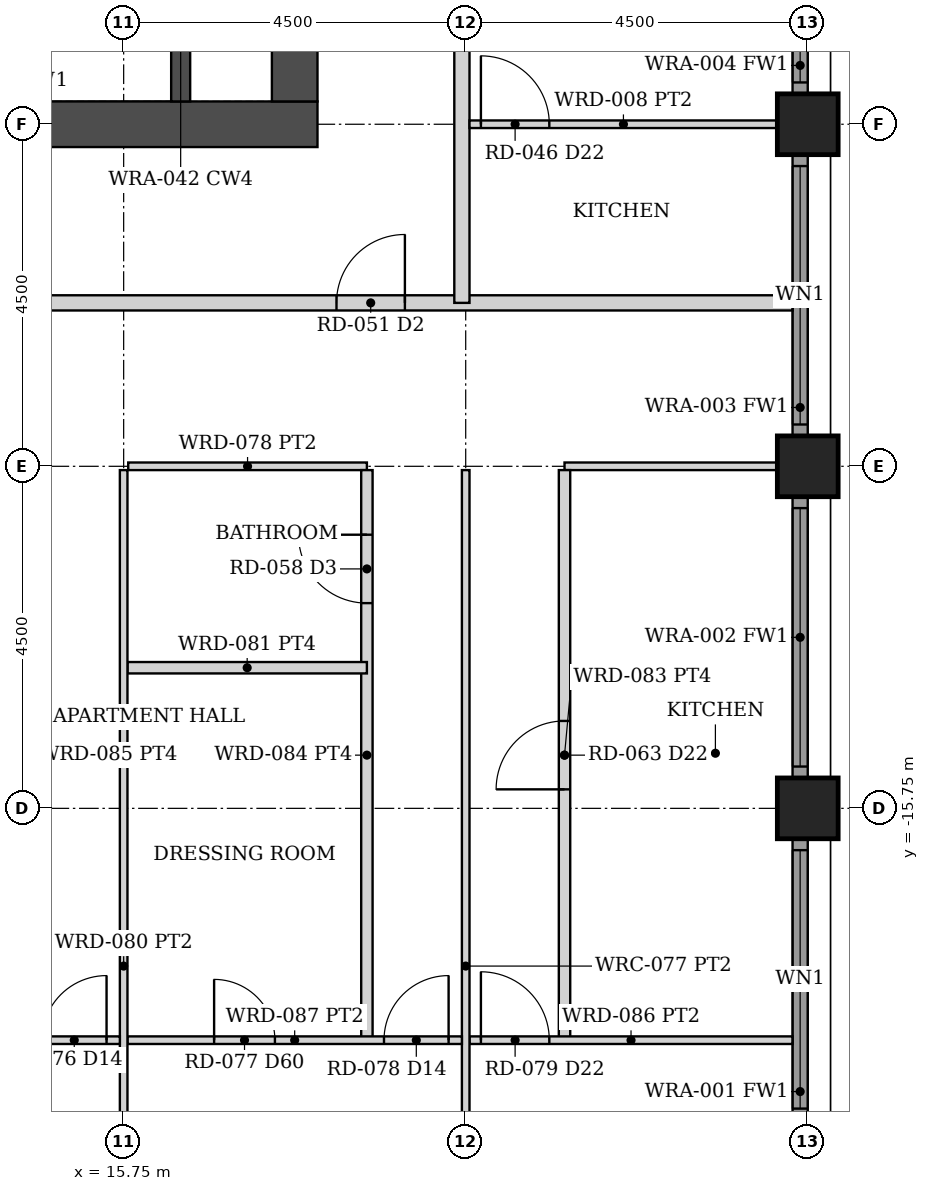
"""IFC4 building model, lengths in metres.
Left out: names, types, materials, properties, quantities, classifications, styles, units other than length and angle.
Written with IfcOpenShell. Run it as: python <this file> out.ifc"""

import sys

from ifc_helpers import new_model, si_unit, direction, frame, frame_2d, origin, origin_2d, place, context, subcontext, project, spatial, rectangle, hollow_rectangle, extrude, element, fill, save


model = new_model("IFC4")
c1 = context("Model", 3, precision=1e-05, world=origin(), true_north=direction((0.0, 1.0)))
c2 = subcontext(c1, "Body", "Model", "MODEL_VIEW")
j1 = project(units=[si_unit("LENGTHUNIT", "METRE"), si_unit("PLANEANGLEUNIT", "RADIAN")], contexts=[c1])
p1 = place(None, origin())
s1 = spatial("IfcSite", under=j1, at=p1, CompositionType="ELEMENT")
p2 = place(p1, origin())
s2 = spatial("IfcBuilding", under=s1, at=p2, CompositionType="ELEMENT")
p3 = place(p2, frame((0.0, 0.0, 58.0)))
s3 = spatial("IfcBuildingStorey", under=s2, at=p3, CompositionType="ELEMENT", Elevation=58.0)
for number, where, z_axis, x_axis in (
    (1, (24.75, -15.75, 0.0), (0.0, 0.0, 1.0), (1.0, 0.0, 0.0)),
    (2, (24.75, -11.25, 0.0), (0.0, 0.0, 1.0), (1.0, 0.0, 0.0)),
    (3, (24.75, -6.75, 0.0), (0.0, 0.0, 1.0), (1.0, 0.0, 0.0)),
):
    element("IfcColumn", number, at=place(p3, frame(where, z_axis=z_axis, x_axis=x_axis)), inside=s3, PredefinedType="COLUMN", context=c2, shape_type="SweptSolid", body=[
        extrude(hollow_rectangle(XDim=0.8, YDim=0.8, WallThickness=0.06, at=origin_2d()), origin(), (0.0, 0.0, 1.0), 3.5),
    ])
p4 = place(p3, frame((8.7, -6.75, 0.0), z_axis=(0.0, 0.0, 1.0), x_axis=(1.0, 0.0, 0.0)))
e4 = element("IfcWall", 4, at=p4, inside=s3, PredefinedType="SHEAR", context=c2, shape_type="SweptSolid", body=[
    extrude(rectangle(XDim=9.6, YDim=0.6, at=frame_2d((4.8, 0.0))), origin(), (0.0, 0.0, 1.0), 3.5),
])
p5 = place(p3, frame((18.0, -6.45, 0.0), z_axis=(0.0, 0.0, 1.0), x_axis=(0.0, 1.0, 0.0)))
e5 = element("IfcWall", 5, at=p5, inside=s3, PredefinedType="SHEAR", context=c2, shape_type="SweptSolid", body=[
    extrude(rectangle(XDim=12.9, YDim=0.6, at=frame_2d((6.45, 0.0))), origin(), (0.0, 0.0, 1.0), 3.5),
])
p6 = place(p3, frame((16.5, -6.45, 0.0), z_axis=(0.0, 0.0, 1.0), x_axis=(0.0, 1.0, 0.0)))
e6 = element("IfcWall", 6, at=p6, inside=s3, PredefinedType="SHEAR", context=c2, shape_type="SweptSolid", body=[
    extrude(rectangle(XDim=3.125, YDim=0.25, at=frame_2d((1.562, 0.0))), origin(), (0.0, 0.0, 1.0), 3.5),
])
p7 = place(p3, frame((24.65, -19.845, 0.0), z_axis=(0.0, 0.0, 1.0), x_axis=(0.0, 1.0, 0.0)))
e7 = element("IfcWall", 7, at=p7, inside=s3, PredefinedType="SOLIDWALL", context=c2, shape_type="SweptSolid", body=[
    extrude(rectangle(XDim=3.69, YDim=0.2, at=frame_2d((1.845, 0.0))), origin(), (0.0, 0.0, 1.0), 2.379),
])
p8 = place(p7, frame((0.145, 0.0, 0.3)))
e8 = element("IfcOpeningElement", 8, at=p8, cuts=e7, PredefinedType="OPENING", context=c2, shape_type="SweptSolid", body=[
    extrude(rectangle(XDim=3.4, YDim=1.929, at=frame_2d((1.7, 0.964))), frame((0.0, 0.11, 0.0), z_axis=(0.0, -1.0, 0.0), x_axis=(1.0, 0.0, 0.0)), (0.0, 0.0, 1.0), 0.22),
])
p9 = place(p3, frame((24.65, -15.345, 0.0), z_axis=(0.0, 0.0, 1.0), x_axis=(0.0, 1.0, 0.0)))
e9 = element("IfcWall", 9, at=p9, inside=s3, PredefinedType="SOLIDWALL", context=c2, shape_type="SweptSolid", body=[
    extrude(rectangle(XDim=3.69, YDim=0.2, at=frame_2d((1.845, 0.0))), origin(), (0.0, 0.0, 1.0), 2.379),
])
p10 = place(p9, frame((0.145, 0.0, 0.3)))
e10 = element("IfcOpeningElement", 10, at=p10, cuts=e9, PredefinedType="OPENING", context=c2, shape_type="SweptSolid", body=[
    extrude(rectangle(XDim=3.4, YDim=1.929, at=frame_2d((1.7, 0.964))), frame((0.0, 0.11, 0.0), z_axis=(0.0, -1.0, 0.0), x_axis=(1.0, 0.0, 0.0)), (0.0, 0.0, 1.0), 0.22),
])
p11 = place(p3, frame((24.65, -10.845, 0.0), z_axis=(0.0, 0.0, 1.0), x_axis=(0.0, 1.0, 0.0)))
e11 = element("IfcWall", 11, at=p11, inside=s3, PredefinedType="SOLIDWALL", context=c2, shape_type="SweptSolid", body=[
    extrude(rectangle(XDim=3.69, YDim=0.2, at=frame_2d((1.845, 0.0))), origin(), (0.0, 0.0, 1.0), 2.379),
])
p12 = place(p11, frame((0.145, 0.0, 0.3)))
e12 = element("IfcOpeningElement", 12, at=p12, cuts=e11, PredefinedType="OPENING", context=c2, shape_type="SweptSolid", body=[
    extrude(rectangle(XDim=3.4, YDim=1.929, at=frame_2d((1.7, 0.964))), frame((0.0, 0.11, 0.0), z_axis=(0.0, -1.0, 0.0), x_axis=(1.0, 0.0, 0.0)), (0.0, 0.0, 1.0), 0.22),
])
p13 = place(p3, frame((24.65, -6.345, 0.0), z_axis=(0.0, 0.0, 1.0), x_axis=(0.0, 1.0, 0.0)))
e13 = element("IfcWall", 13, at=p13, inside=s3, PredefinedType="SOLIDWALL", context=c2, shape_type="SweptSolid", body=[
    extrude(rectangle(XDim=3.69, YDim=0.2, at=frame_2d((1.845, 0.0))), origin(), (0.0, 0.0, 1.0), 2.379),
])
p14 = place(p13, frame((0.145, 0.0, 0.3)))
e14 = element("IfcOpeningElement", 14, at=p14, cuts=e13, PredefinedType="OPENING", context=c2, shape_type="SweptSolid", body=[
    extrude(rectangle(XDim=3.4, YDim=1.929, at=frame_2d((1.7, 0.964))), frame((0.0, 0.11, 0.0), z_axis=(0.0, -1.0, 0.0), x_axis=(1.0, 0.0, 0.0)), (0.0, 0.0, 1.0), 0.22),
])
p15 = place(p3, frame((-24.55, -9.1, 0.0), z_axis=(0.0, 0.0, 1.0), x_axis=(1.0, 0.0, 0.0)))
e15 = element("IfcWall", 15, at=p15, inside=s3, PredefinedType="PARTITIONING", context=c2, shape_type="SweptSolid", body=[
    extrude(rectangle(XDim=49.1, YDim=0.2, at=frame_2d((24.55, 0.0))), origin(), (0.0, 0.0, 1.0), 2.373),
])
p16 = place(p15, frame((5.1, 0.0, 0.0)))
e16 = element("IfcOpeningElement", 16, at=p16, cuts=e15, PredefinedType="OPENING", context=c2, shape_type="SweptSolid", body=[
    extrude(rectangle(XDim=0.9, YDim=2.1, at=frame_2d((0.45, 1.05))), frame((0.0, 0.11, 0.0), z_axis=(0.0, -1.0, 0.0), x_axis=(1.0, 0.0, 0.0)), (0.0, 0.0, 1.0), 0.22),
])
p17 = place(p15, frame((18.1, 0.0, 0.0)))
e17 = element("IfcOpeningElement", 17, at=p17, cuts=e15, PredefinedType="OPENING", context=c2, shape_type="SweptSolid", body=[
    extrude(rectangle(XDim=0.9, YDim=2.1, at=frame_2d((0.45, 1.05))), frame((0.0, 0.11, 0.0), z_axis=(0.0, -1.0, 0.0), x_axis=(1.0, 0.0, 0.0)), (0.0, 0.0, 1.0), 0.22),
])
p18 = place(p15, frame((22.5, 0.0, 0.0)))
e18 = element("IfcOpeningElement", 18, at=p18, cuts=e15, PredefinedType="OPENING", context=c2, shape_type="SweptSolid", body=[
    extrude(rectangle(XDim=0.9, YDim=2.1, at=frame_2d((0.45, 1.05))), frame((0.0, 0.11, 0.0), z_axis=(0.0, -1.0, 0.0), x_axis=(1.0, 0.0, 0.0)), (0.0, 0.0, 1.0), 0.22),
])
p19 = place(p15, frame((27.1, 0.0, 0.0)))
e19 = element("IfcOpeningElement", 19, at=p19, cuts=e15, PredefinedType="OPENING", context=c2, shape_type="SweptSolid", body=[
    extrude(rectangle(XDim=0.9, YDim=2.1, at=frame_2d((0.45, 1.05))), frame((0.0, 0.11, 0.0), z_axis=(0.0, -1.0, 0.0), x_axis=(1.0, 0.0, 0.0)), (0.0, 0.0, 1.0), 0.22),
])
p20 = place(p15, frame((43.1, 0.0, 0.0)))
e20 = element("IfcOpeningElement", 20, at=p20, cuts=e15, PredefinedType="OPENING", context=c2, shape_type="SweptSolid", body=[
    extrude(rectangle(XDim=0.9, YDim=2.1, at=frame_2d((0.45, 1.05))), frame((0.0, 0.11, 0.0), z_axis=(0.0, -1.0, 0.0), x_axis=(1.0, 0.0, 0.0)), (0.0, 0.0, 1.0), 0.22),
])
p21 = place(p3, frame((20.2, -9.1, 0.0), z_axis=(0.0, 0.0, 1.0), x_axis=(0.0, 1.0, 0.0)))
e21 = element("IfcWall", 21, at=p21, inside=s3, PredefinedType="PARTITIONING", context=c2, shape_type="SweptSolid", body=[
    extrude(rectangle(XDim=18.2, YDim=0.2, at=frame_2d((9.1, 0.0))), origin(), (0.0, 0.0, 1.0), 2.373),
])
p22 = place(p21, frame((6.4, 0.0, 0.0)))
e22 = element("IfcOpeningElement", 22, at=p22, cuts=e21, PredefinedType="OPENING", context=c2, shape_type="SweptSolid", body=[
    extrude(rectangle(XDim=0.9, YDim=2.1, at=frame_2d((0.45, 1.05))), frame((0.0, 0.11, 0.0), z_axis=(0.0, -1.0, 0.0), x_axis=(1.0, 0.0, 0.0)), (0.0, 0.0, 1.0), 0.22),
])
p23 = place(p3, frame((21.55, -11.25, 0.0), z_axis=(0.0, 0.0, 1.0), x_axis=(1.0, 0.0, 0.0)))
e23 = element("IfcWall", 23, at=p23, inside=s3, PredefinedType="PARTITIONING", context=c2, shape_type="SweptSolid", body=[
    extrude(rectangle(XDim=2.8, YDim=0.1, at=frame_2d((1.4, 0.0))), origin(), (0.0, 0.0, 1.0), 2.373),
])
p24 = place(p3, frame((21.55, -18.8, 0.0), z_axis=(0.0, 0.0, 1.0), x_axis=(0.0, 1.0, 0.0)))
e24 = element("IfcWall", 24, at=p24, inside=s3, PredefinedType="PARTITIONING", context=c2, shape_type="SweptSolid", body=[
    extrude(rectangle(XDim=7.5, YDim=0.15, at=frame_2d((3.75, 0.0))), origin(), (0.0, 0.0, 1.0), 2.373),
])
p25 = place(p24, frame((3.3, 0.0, 0.0)))
e25 = element("IfcOpeningElement", 25, at=p25, cuts=e24, PredefinedType="OPENING", context=c2, shape_type="SweptSolid", body=[
    extrude(rectangle(XDim=0.9, YDim=2.1, at=frame_2d((0.45, 1.05))), frame((0.0, 0.085, 0.0), z_axis=(0.0, -1.0, 0.0), x_axis=(1.0, 0.0, 0.0)), (0.0, 0.0, 1.0), 0.17),
])
p26 = place(p3, frame((20.3, -18.8, 0.0), z_axis=(0.0, 0.0, 1.0), x_axis=(1.0, 0.0, 0.0)))
e26 = element("IfcWall", 26, at=p26, inside=s3, PredefinedType="PARTITIONING", context=c2, shape_type="SweptSolid", body=[
    extrude(rectangle(XDim=4.25, YDim=0.1, at=frame_2d((2.125, 0.0))), origin(), (0.0, 0.0, 1.0), 2.373),
])
p27 = place(p26, frame((0.15, 0.0, 0.0)))
e27 = element("IfcOpeningElement", 27, at=p27, cuts=e26, PredefinedType="OPENING", context=c2, shape_type="SweptSolid", body=[
    extrude(rectangle(XDim=0.9, YDim=2.1, at=frame_2d((0.45, 1.05))), frame((0.0, 0.06, 0.0), z_axis=(0.0, -1.0, 0.0), x_axis=(1.0, 0.0, 0.0)), (0.0, 0.0, 1.0), 0.12),
])
p28 = place(p3, frame((20.25, -24.35, 0.0), z_axis=(0.0, 0.0, 1.0), x_axis=(0.0, 1.0, 0.0)))
e28 = element("IfcWall", 28, at=p28, inside=s3, PredefinedType="PARTITIONING", context=c2, shape_type="SweptSolid", body=[
    extrude(rectangle(XDim=13.05, YDim=0.1, at=frame_2d((6.525, 0.0))), origin(), (0.0, 0.0, 1.0), 2.373),
])
p29 = place(p3, frame((15.81, -11.25, 0.0), z_axis=(0.0, 0.0, 1.0), x_axis=(1.0, 0.0, 0.0)))
e29 = element("IfcWall", 29, at=p29, inside=s3, PredefinedType="PARTITIONING", context=c2, shape_type="SweptSolid", body=[
    extrude(rectangle(XDim=3.14, YDim=0.1, at=frame_2d((1.57, 0.0))), origin(), (0.0, 0.0, 1.0), 2.373),
])
p30 = place(p3, frame((18.95, -18.8, 0.0), z_axis=(0.0, 0.0, 1.0), x_axis=(0.0, 1.0, 0.0)))
e30 = element("IfcWall", 30, at=p30, inside=s3, PredefinedType="PARTITIONING", context=c2, shape_type="SweptSolid", body=[
    extrude(rectangle(XDim=7.5, YDim=0.15, at=frame_2d((3.75, 0.0))), origin(), (0.0, 0.0, 1.0), 2.373),
])
p31 = place(p30, frame((5.75, 0.0, 0.0)))
e31 = element("IfcOpeningElement", 31, at=p31, cuts=e30, PredefinedType="OPENING", context=c2, shape_type="SweptSolid", body=[
    extrude(rectangle(XDim=0.9, YDim=2.1, at=frame_2d((0.45, 1.05))), frame((0.0, 0.085, 0.0), z_axis=(0.0, -1.0, 0.0), x_axis=(1.0, 0.0, 0.0)), (0.0, 0.0, 1.0), 0.17),
])
p32 = place(p3, frame((15.8, -18.8, 0.0), z_axis=(0.0, 0.0, 1.0), x_axis=(1.0, 0.0, 0.0)))
e32 = element("IfcWall", 32, at=p32, inside=s3, PredefinedType="PARTITIONING", context=c2, shape_type="SweptSolid", body=[
    extrude(rectangle(XDim=4.4, YDim=0.1, at=frame_2d((2.2, 0.0))), origin(), (0.0, 0.0, 1.0), 2.373),
])
p33 = place(p32, frame((3.375, 0.0, 0.0)))
e33 = element("IfcOpeningElement", 33, at=p33, cuts=e32, PredefinedType="OPENING", context=c2, shape_type="SweptSolid", body=[
    extrude(rectangle(XDim=0.85, YDim=2.1, at=frame_2d((0.425, 1.05))), frame((0.0, 0.06, 0.0), z_axis=(0.0, -1.0, 0.0), x_axis=(1.0, 0.0, 0.0)), (0.0, 0.0, 1.0), 0.12),
])
p34 = place(p32, frame((1.14, 0.0, 0.0)))
e34 = element("IfcOpeningElement", 34, at=p34, cuts=e32, PredefinedType="OPENING", context=c2, shape_type="SweptSolid", body=[
    extrude(rectangle(XDim=0.8, YDim=2.1, at=frame_2d((0.4, 1.05))), frame((0.0, 0.06, 0.0), z_axis=(0.0, -1.0, 0.0), x_axis=(1.0, 0.0, 0.0)), (0.0, 0.0, 1.0), 0.12),
])
p35 = place(p3, frame((15.8, -13.9, 0.0), z_axis=(0.0, 0.0, 1.0), x_axis=(1.0, 0.0, 0.0)))
e35 = element("IfcWall", 35, at=p35, inside=s3, PredefinedType="PARTITIONING", context=c2, shape_type="SweptSolid", body=[
    extrude(rectangle(XDim=3.15, YDim=0.15, at=frame_2d((1.575, 0.0))), origin(), (0.0, 0.0, 1.0), 2.373),
])
p36 = place(p3, frame((15.75, -24.35, 0.0), z_axis=(0.0, 0.0, 1.0), x_axis=(0.0, 1.0, 0.0)))
e36 = element("IfcWall", 36, at=p36, inside=s3, PredefinedType="PARTITIONING", context=c2, shape_type="SweptSolid", body=[
    extrude(rectangle(XDim=13.05, YDim=0.1, at=frame_2d((6.525, 0.0))), origin(), (0.0, 0.0, 1.0), 2.373),
])
p37 = place(p3, frame((11.31, -18.8, 0.0), z_axis=(0.0, 0.0, 1.0), x_axis=(1.0, 0.0, 0.0)))
e37 = element("IfcWall", 37, at=p37, inside=s3, PredefinedType="PARTITIONING", context=c2, shape_type="SweptSolid", body=[
    extrude(rectangle(XDim=4.39, YDim=0.1, at=frame_2d((2.195, 0.0))), origin(), (0.0, 0.0, 1.0), 2.373),
])
p38 = place(p37, frame((3.365, 0.0, 0.0)))
e38 = element("IfcOpeningElement", 38, at=p38, cuts=e37, PredefinedType="OPENING", context=c2, shape_type="SweptSolid", body=[
    extrude(rectangle(XDim=0.85, YDim=2.1, at=frame_2d((0.425, 1.05))), frame((0.0, 0.06, 0.0), z_axis=(0.0, -1.0, 0.0), x_axis=(1.0, 0.0, 0.0)), (0.0, 0.0, 1.0), 0.12),
])
p39 = place(p37, frame((1.13, 0.0, 0.0)))
e39 = element("IfcOpeningElement", 39, at=p39, cuts=e37, PredefinedType="OPENING", context=c2, shape_type="SweptSolid", body=[
    extrude(rectangle(XDim=0.8, YDim=2.1, at=frame_2d((0.4, 1.05))), frame((0.0, 0.06, 0.0), z_axis=(0.0, -1.0, 0.0), x_axis=(1.0, 0.0, 0.0)), (0.0, 0.0, 1.0), 0.12),
])
p40 = place(p3, frame((20.3, -6.75, 0.0), z_axis=(0.0, 0.0, 1.0), x_axis=(1.0, 0.0, 0.0)))
e40 = element("IfcWall", 40, at=p40, inside=s3, PredefinedType="PARTITIONING", context=c2, shape_type="SweptSolid", body=[
    extrude(rectangle(XDim=4.05, YDim=0.1, at=frame_2d((2.025, 0.0))), origin(), (0.0, 0.0, 1.0), 2.373),
])
p41 = place(p40, frame((0.15, 0.0, 0.0)))
e41 = element("IfcOpeningElement", 41, at=p41, cuts=e40, PredefinedType="OPENING", context=c2, shape_type="SweptSolid", body=[
    extrude(rectangle(XDim=0.9, YDim=2.1, at=frame_2d((0.45, 1.05))), frame((0.0, 0.06, 0.0), z_axis=(0.0, -1.0, 0.0), x_axis=(1.0, 0.0, 0.0)), (0.0, 0.0, 1.0), 0.12),
])
p42 = place(p8, origin())
e42 = element("IfcWindow", 42, at=p42, inside=s3, PartitioningType="SINGLE_PANEL", PredefinedType="WINDOW", context=c2, shape_type="SweptSolid", body=[
    extrude(rectangle(XDim=3.4, YDim=1.929, at=frame_2d((1.7, 0.964))), frame((0.0, 0.03, 0.0), z_axis=(0.0, -1.0, 0.0), x_axis=(1.0, 0.0, 0.0)), (0.0, 0.0, 1.0), 0.06),
])
fill(e8, e42)
p43 = place(p10, origin())
e43 = element("IfcWindow", 43, at=p43, inside=s3, PartitioningType="SINGLE_PANEL", PredefinedType="WINDOW", context=c2, shape_type="SweptSolid", body=[
    extrude(rectangle(XDim=3.4, YDim=1.929, at=frame_2d((1.7, 0.964))), frame((0.0, 0.03, 0.0), z_axis=(0.0, -1.0, 0.0), x_axis=(1.0, 0.0, 0.0)), (0.0, 0.0, 1.0), 0.06),
])
fill(e10, e43)
p44 = place(p12, origin())
e44 = element("IfcWindow", 44, at=p44, inside=s3, PartitioningType="SINGLE_PANEL", PredefinedType="WINDOW", context=c2, shape_type="SweptSolid", body=[
    extrude(rectangle(XDim=3.4, YDim=1.929, at=frame_2d((1.7, 0.964))), frame((0.0, 0.03, 0.0), z_axis=(0.0, -1.0, 0.0), x_axis=(1.0, 0.0, 0.0)), (0.0, 0.0, 1.0), 0.06),
])
fill(e12, e44)
p45 = place(p14, origin())
e45 = element("IfcWindow", 45, at=p45, inside=s3, PartitioningType="SINGLE_PANEL", PredefinedType="WINDOW", context=c2, shape_type="SweptSolid", body=[
    extrude(rectangle(XDim=3.4, YDim=1.929, at=frame_2d((1.7, 0.964))), frame((0.0, 0.03, 0.0), z_axis=(0.0, -1.0, 0.0), x_axis=(1.0, 0.0, 0.0)), (0.0, 0.0, 1.0), 0.06),
])
fill(e14, e45)
p46 = place(p20, origin())
e46 = element("IfcDoor", 46, at=p46, inside=s3, OperationType="SINGLE_SWING_RIGHT", PredefinedType="DOOR", context=c2, shape_type="SweptSolid", body=[
    extrude(rectangle(XDim=0.9, YDim=2.1, at=frame_2d((0.45, 1.05))), frame((0.0, 0.025, 0.0), z_axis=(0.0, -1.0, 0.0), x_axis=(1.0, 0.0, 0.0)), (0.0, 0.0, 1.0), 0.05),
])
fill(e20, e46)
p47 = place(p25, origin())
e47 = element("IfcDoor", 47, at=p47, inside=s3, OperationType="SINGLE_SWING_LEFT", PredefinedType="DOOR", context=c2, shape_type="SweptSolid", body=[
    extrude(rectangle(XDim=0.9, YDim=2.1, at=frame_2d((0.45, 1.05))), frame((0.0, 0.025, 0.0), z_axis=(0.0, -1.0, 0.0), x_axis=(1.0, 0.0, 0.0)), (0.0, 0.0, 1.0), 0.05),
])
fill(e25, e47)
p48 = place(p27, origin())
e48 = element("IfcDoor", 48, at=p48, inside=s3, OperationType="SINGLE_SWING_LEFT", PredefinedType="DOOR", context=c2, shape_type="SweptSolid", body=[
    extrude(rectangle(XDim=0.9, YDim=2.1, at=frame_2d((0.45, 1.05))), frame((0.0, 0.025, 0.0), z_axis=(0.0, -1.0, 0.0), x_axis=(1.0, 0.0, 0.0)), (0.0, 0.0, 1.0), 0.05),
])
fill(e27, e48)
p49 = place(p33, origin())
e49 = element("IfcDoor", 49, at=p49, inside=s3, OperationType="SINGLE_SWING_RIGHT", PredefinedType="DOOR", context=c2, shape_type="SweptSolid", body=[
    extrude(rectangle(XDim=0.85, YDim=2.1, at=frame_2d((0.425, 1.05))), frame((0.0, 0.025, 0.0), z_axis=(0.0, -1.0, 0.0), x_axis=(1.0, 0.0, 0.0)), (0.0, 0.0, 1.0), 0.05),
])
fill(e33, e49)
p50 = place(p31, origin())
e50 = element("IfcDoor", 50, at=p50, inside=s3, OperationType="SINGLE_SWING_RIGHT", PredefinedType="DOOR", context=c2, shape_type="SweptSolid", body=[
    extrude(rectangle(XDim=0.9, YDim=2.1, at=frame_2d((0.45, 1.05))), frame((0.0, 0.025, 0.0), z_axis=(0.0, -1.0, 0.0), x_axis=(1.0, 0.0, 0.0)), (0.0, 0.0, 1.0), 0.05),
])
fill(e31, e50)
p51 = place(p34, origin())
e51 = element("IfcDoor", 51, at=p51, inside=s3, OperationType="SINGLE_SWING_LEFT", PredefinedType="DOOR", context=c2, shape_type="SweptSolid", body=[
    extrude(rectangle(XDim=0.8, YDim=2.1, at=frame_2d((0.4, 1.05))), frame((0.0, 0.025, 0.0), z_axis=(0.0, -1.0, 0.0), x_axis=(1.0, 0.0, 0.0)), (0.0, 0.0, 1.0), 0.05),
])
fill(e34, e51)
p52 = place(p38, origin())
e52 = element("IfcDoor", 52, at=p52, inside=s3, OperationType="SINGLE_SWING_RIGHT", PredefinedType="DOOR", context=c2, shape_type="SweptSolid", body=[
    extrude(rectangle(XDim=0.85, YDim=2.1, at=frame_2d((0.425, 1.05))), frame((0.0, 0.025, 0.0), z_axis=(0.0, -1.0, 0.0), x_axis=(1.0, 0.0, 0.0)), (0.0, 0.0, 1.0), 0.05),
])
fill(e38, e52)
p53 = place(p41, origin())
e53 = element("IfcDoor", 53, at=p53, inside=s3, OperationType="SINGLE_SWING_LEFT", PredefinedType="DOOR", context=c2, shape_type="SweptSolid", body=[
    extrude(rectangle(XDim=0.9, YDim=2.1, at=frame_2d((0.45, 1.05))), frame((0.0, 0.025, 0.0), z_axis=(0.0, -1.0, 0.0), x_axis=(1.0, 0.0, 0.0)), (0.0, 0.0, 1.0), 0.05),
])
fill(e41, e53)
save(model, sys.argv[1])
